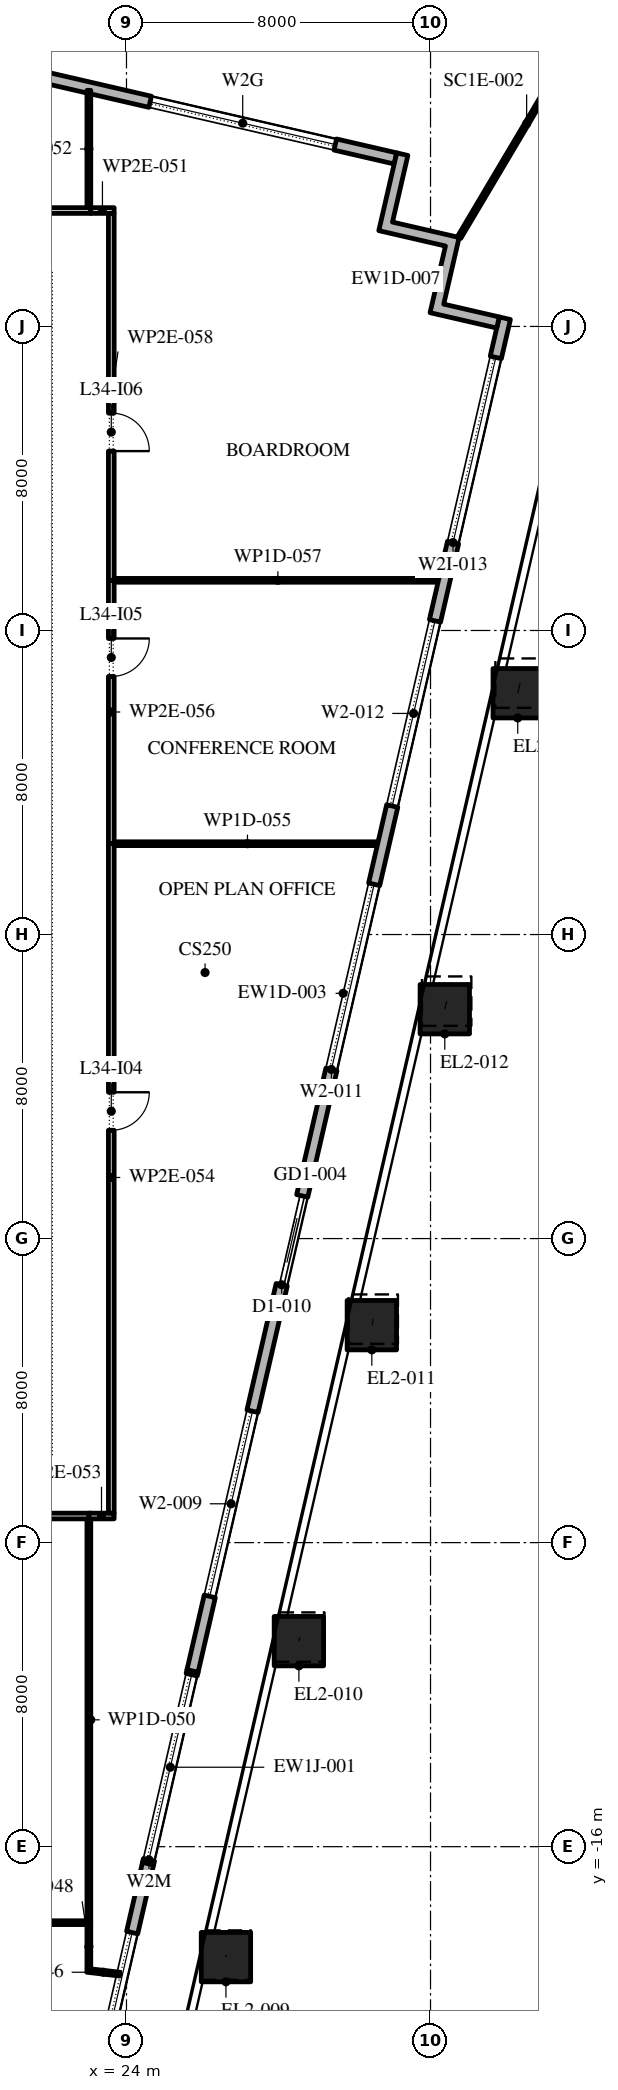
"""IFC4 building model, lengths in metres.
Left out: names, types, materials, properties, quantities, classifications, styles, units other than length and angle.
Written with IfcOpenShell. Run it as: python <this file> out.ifc"""

import sys

from ifc_helpers import new_model, si_unit, direction, frame, frame_2d, origin, origin_2d, place, context, subcontext, project, spatial, polyline, rectangle, outline, extrude, element, fill, save


model = new_model("IFC4")
c1 = context("Model", 3, precision=1e-05, world=origin(), true_north=direction((0.0, 1.0)))
c2 = subcontext(c1, "Body", "Model", "MODEL_VIEW")
j1 = project(units=[si_unit("LENGTHUNIT", "METRE"), si_unit("PLANEANGLEUNIT", "RADIAN")], contexts=[c1])
p1 = place(None, origin())
s1 = spatial("IfcSite", under=j1, at=p1, CompositionType="ELEMENT")
p2 = place(p1, origin())
s2 = spatial("IfcBuilding", under=s1, at=p2, CompositionType="ELEMENT")
p3 = place(p2, frame((0.0, 0.0, 156.0)))
s3 = spatial("IfcBuildingStorey", under=s2, at=p3, CompositionType="ELEMENT", Elevation=156.0)
p4 = place(p3, frame((26.617, -18.906, 0.0), z_axis=(0.002964348167, 0.012671135303, 0.9999153239), x_axis=(-0.973709261374, 0.227794368487, 0.0)))
e1 = element("IfcColumn", 1, at=p4, inside=s3, PredefinedType="COLUMN", context=c2, shape_type="SweptSolid", body=[
    extrude(rectangle(XDim=1.3, YDim=1.3, at=origin_2d()), origin(), (0.0, 0.0, 1.0), 4.2),
])
p5 = place(p3, frame((28.536, -10.592, 0.0), z_axis=(0.005869091843, 0.025277771797, 0.999663237302), x_axis=(-0.974088391429, 0.226167649504, 0.0)))
e2 = element("IfcColumn", 2, at=p5, inside=s3, PredefinedType="COLUMN", context=c2, shape_type="SweptSolid", body=[
    extrude(rectangle(XDim=1.3, YDim=1.3, at=origin_2d()), origin(), (0.0, 0.0, 1.0), 4.201),
])
p6 = place(p3, frame((30.456, -2.279, 0.0), z_axis=(0.008770865357, 0.037987721479, 0.999239713451), x_axis=(-0.97436607968, 0.224968315033, 0.0)))
e3 = element("IfcColumn", 3, at=p6, inside=s3, PredefinedType="COLUMN", context=c2, shape_type="SweptSolid", body=[
    extrude(rectangle(XDim=1.3, YDim=1.3, at=origin_2d()), origin(), (0.0, 0.0, 1.0), 4.203),
])
p7 = place(p3, frame((32.375, 6.035, 0.0), z_axis=(0.011668267153, 0.050562490995, 0.998652735462), x_axis=(-0.974391195695, 0.224859506699, 0.0)))
e4 = element("IfcColumn", 4, at=p7, inside=s3, PredefinedType="COLUMN", context=c2, shape_type="SweptSolid", body=[
    extrude(rectangle(XDim=1.3, YDim=1.3, at=origin_2d()), origin(), (0.0, 0.0, 1.0), 4.206),
])
p8 = place(p3, frame((34.295, 14.349, 0.0), z_axis=(0.014559841898, 0.063111984005, 0.997900239743), x_axis=(-0.97440628778, 0.224794097641, 0.0)))
e5 = element("IfcColumn", 5, at=p8, inside=s3, PredefinedType="COLUMN", context=c2, shape_type="SweptSolid", body=[
    extrude(rectangle(XDim=1.3, YDim=1.3, at=origin_2d()), origin(), (0.0, 0.0, 1.0), 4.209),
])
p9 = place(p3, frame((22.82, -24.016, 0.0), z_axis=(0.0, 0.0, 1.0), x_axis=(0.224962751334, 0.974367364248, 0.0)))
e6 = element("IfcWall", 6, at=p9, inside=s3, PredefinedType="STANDARD", context=c2, shape_type="SweptSolid", body=[
    extrude(rectangle(XDim=7.771, YDim=0.3, at=frame_2d((3.886, 0.0))), origin(), (0.0, 0.0, 1.0), 3.9),
])
p10 = place(p9, frame((0.907, 0.0, 0.45)))
e7 = element("IfcOpeningElement", 7, at=p10, cuts=e6, PredefinedType="OPENING", context=c2, shape_type="SweptSolid", body=[
    extrude(rectangle(XDim=5.0, YDim=3.25, at=frame_2d((2.5, 1.625))), frame((0.0, 0.16, 0.0), z_axis=(0.0, -1.0, 0.0), x_axis=(1.0, 0.0, 0.0)), (0.0, 0.0, 1.0), 0.32),
])
p11 = place(p3, frame((31.078, 28.421, 0.0), z_axis=(0.0, 0.0, 1.0), x_axis=(-0.974370456532, 0.224949357493, 0.0)))
e8 = element("IfcWall", 8, at=p11, inside=s3, PredefinedType="STANDARD", context=c2, shape_type="SweptSolid", body=[
    extrude(rectangle(XDim=51.0, YDim=0.3, at=frame_2d((25.5, 0.0))), origin(), (0.0, 0.0, 1.0), 3.9),
])
p12 = place(p11, frame((1.625, 0.0, 0.45)))
e9 = element("IfcOpeningElement", 9, at=p12, cuts=e8, PredefinedType="OPENING", context=c2, shape_type="SweptSolid", body=[
    extrude(rectangle(XDim=5.0, YDim=2.725, at=frame_2d((2.5, 1.363))), frame((0.0, 0.16, 0.0), z_axis=(0.0, -1.0, 0.0), x_axis=(1.0, 0.0, 0.0)), (0.0, 0.0, 1.0), 0.32),
])
p13 = place(p11, frame((10.025, 0.0, 0.45)))
e10 = element("IfcOpeningElement", 10, at=p13, cuts=e8, PredefinedType="OPENING", context=c2, shape_type="SweptSolid", body=[
    extrude(rectangle(XDim=5.0, YDim=2.65, at=frame_2d((2.5, 1.325))), frame((0.0, 0.16, 0.0), z_axis=(0.0, -1.0, 0.0), x_axis=(1.0, 0.0, 0.0)), (0.0, 0.0, 1.0), 0.32),
])
p14 = place(p11, frame((18.575, 0.0, 0.45)))
e11 = element("IfcOpeningElement", 11, at=p14, cuts=e8, PredefinedType="OPENING", context=c2, shape_type="SweptSolid", body=[
    extrude(rectangle(XDim=5.0, YDim=2.575, at=frame_2d((2.5, 1.288))), frame((0.0, 0.16, 0.0), z_axis=(0.0, -1.0, 0.0), x_axis=(1.0, 0.0, 0.0)), (0.0, 0.0, 1.0), 0.32),
])
p15 = place(p11, frame((28.425, 0.0, 0.0)))
e12 = element("IfcOpeningElement", 12, at=p15, cuts=e8, PredefinedType="OPENING", context=c2, shape_type="SweptSolid", body=[
    extrude(rectangle(XDim=2.4, YDim=3.5, at=frame_2d((1.2, 1.75))), frame((0.0, 0.16, 0.0), z_axis=(0.0, -1.0, 0.0), x_axis=(1.0, 0.0, 0.0)), (0.0, 0.0, 1.0), 0.32),
])
p16 = place(p11, frame((35.675, 0.0, 0.45)))
e13 = element("IfcOpeningElement", 13, at=p16, cuts=e8, PredefinedType="OPENING", context=c2, shape_type="SweptSolid", body=[
    extrude(rectangle(XDim=5.0, YDim=2.4, at=frame_2d((2.5, 1.2))), frame((0.0, 0.16, 0.0), z_axis=(0.0, -1.0, 0.0), x_axis=(1.0, 0.0, 0.0)), (0.0, 0.0, 1.0), 0.32),
])
p17 = place(p11, frame((44.225, 0.0, 0.45)))
e14 = element("IfcOpeningElement", 14, at=p17, cuts=e8, PredefinedType="OPENING", context=c2, shape_type="SweptSolid", body=[
    extrude(rectangle(XDim=5.0, YDim=3.25, at=frame_2d((2.5, 1.625))), frame((0.0, 0.16, 0.0), z_axis=(0.0, -1.0, 0.0), x_axis=(1.0, 0.0, 0.0)), (0.0, 0.0, 1.0), 0.32),
])
p18 = place(p3, origin())
e15 = element("IfcWall", 15, at=p18, inside=s3, PredefinedType="STANDARD", context=c2, shape_type="SweptSolid", body=[
    extrude(outline(polyline([(32.393, 26.116), (30.639, 26.521), (31.111, 28.567), (31.404, 28.5), (30.999, 26.746), (32.753, 26.341), (32.348, 24.587), (33.809, 24.25), (33.742, 23.957), (31.988, 24.362), (32.393, 26.116)])), origin(), (0.0, 0.0, 1.0), 3.9),
])
p19 = place(p3, frame((32.753, 26.341, -0.05), z_axis=(0.0, 0.0, 1.0), x_axis=(0.510322384833, 0.859983176311, 0.0)))
e16 = element("IfcWall", 16, at=p19, inside=s3, PredefinedType="STANDARD", context=c2, shape_type="SweptSolid", body=[
    extrude(rectangle(XDim=6.961, YDim=0.1, at=frame_2d((3.48, 0.0))), origin(), (0.0, 0.0, 1.0), 3.95),
])
p20 = place(p3, frame((10.32, 27.05, 0.0), z_axis=(0.0, 0.0, 1.0), x_axis=(1.0, 0.0, 0.0)))
e17 = element("IfcWall", 17, at=p20, inside=s3, PredefinedType="PARTITIONING", context=c2, shape_type="SweptSolid", body=[
    extrude(rectangle(XDim=12.74, YDim=0.15, at=frame_2d((6.37, 0.0))), origin(), (0.0, 0.0, 1.0), 3.9),
])
p21 = place(p20, frame((7.04, 0.0, 0.0)))
e18 = element("IfcOpeningElement", 18, at=p21, cuts=e17, PredefinedType="OPENING", context=c2, shape_type="SweptSolid", body=[
    extrude(rectangle(XDim=1.0, YDim=2.1, at=frame_2d((0.5, 1.05))), frame((0.0, 0.085, 0.0), z_axis=(0.0, -1.0, 0.0), x_axis=(1.0, 0.0, 0.0)), (0.0, 0.0, 1.0), 0.17),
])
p22 = place(p3, frame((22.96, -19.254, 0.0), z_axis=(0.0, 0.0, 1.0), x_axis=(0.993370815498, -0.114954003487, 0.0)))
e19 = element("IfcWall", 19, at=p22, inside=s3, PredefinedType="PARTITIONING", context=c2, shape_type="SweptSolid", body=[
    extrude(rectangle(XDim=0.871, YDim=0.1, at=frame_2d((0.436, 0.0))), origin(), (0.0, 0.0, 1.0), 3.9),
])
p23 = place(p3, frame((23.06, -18.0, 0.0), z_axis=(0.0, 0.0, 1.0), x_axis=(-1.0, 0.0, 0.0)))
e20 = element("IfcWall", 20, at=p23, inside=s3, PredefinedType="PARTITIONING", context=c2, shape_type="SweptSolid", body=[
    extrude(rectangle(XDim=12.69, YDim=0.1, at=frame_2d((6.345, 0.0))), origin(), (0.0, 0.0, 1.0), 3.9),
])
p24 = place(p23, frame((5.89, 0.0, 0.0)))
e21 = element("IfcOpeningElement", 21, at=p24, cuts=e20, PredefinedType="OPENING", context=c2, shape_type="SweptSolid", body=[
    extrude(rectangle(XDim=0.9, YDim=2.1, at=frame_2d((0.45, 1.05))), frame((0.0, 0.06, 0.0), z_axis=(0.0, -1.0, 0.0), x_axis=(1.0, 0.0, 0.0)), (0.0, 0.0, 1.0), 0.12),
])
p25 = place(p3, frame((23.01, -18.05, 0.0), z_axis=(0.0, 0.0, 1.0), x_axis=(0.0, -1.0, 0.0)))
e22 = element("IfcWall", 22, at=p25, inside=s3, PredefinedType="PARTITIONING", context=c2, shape_type="SweptSolid", body=[
    extrude(rectangle(XDim=1.16, YDim=0.1, at=frame_2d((0.58, 0.0))), origin(), (0.0, 0.0, 1.0), 3.9),
])
p26 = place(p3, frame((23.06, -7.3, 0.0), z_axis=(0.0, 0.0, 1.0), x_axis=(-1.0, 0.0, 0.0)))
e23 = element("IfcWall", 23, at=p26, inside=s3, PredefinedType="PARTITIONING", context=c2, shape_type="SweptSolid", body=[
    extrude(rectangle(XDim=12.69, YDim=0.15, at=frame_2d((6.345, 0.0))), origin(), (0.0, 0.0, 1.0), 3.9),
])
p27 = place(p26, frame((5.84, 0.0, 0.0)))
e24 = element("IfcOpeningElement", 24, at=p27, cuts=e23, PredefinedType="OPENING", context=c2, shape_type="SweptSolid", body=[
    extrude(rectangle(XDim=1.0, YDim=2.1, at=frame_2d((0.5, 1.05))), frame((0.0, 0.085, 0.0), z_axis=(0.0, -1.0, 0.0), x_axis=(1.0, 0.0, 0.0)), (0.0, 0.0, 1.0), 0.17),
])
p28 = place(p3, frame((23.01, -7.375, 0.0), z_axis=(0.0, 0.0, 1.0), x_axis=(0.0, -1.0, 0.0)))
e25 = element("IfcWall", 25, at=p28, inside=s3, PredefinedType="PARTITIONING", context=c2, shape_type="SweptSolid", body=[
    extrude(rectangle(XDim=10.575, YDim=0.1, at=frame_2d((5.288, 0.0))), origin(), (0.0, 0.0, 1.0), 3.9),
])
p29 = place(p3, frame((23.06, 27.05, 0.0), z_axis=(0.0, 0.0, 1.0), x_axis=(1.0, 0.0, 0.0)))
e26 = element("IfcWall", 26, at=p29, inside=s3, PredefinedType="PARTITIONING", context=c2, shape_type="SweptSolid", body=[
    extrude(rectangle(XDim=0.615, YDim=0.15, at=frame_2d((0.308, 0.0))), origin(), (0.0, 0.0, 1.0), 3.9),
])
p30 = place(p3, frame((23.01, 30.212, 0.0), z_axis=(0.0, 0.0, 1.0), x_axis=(0.0, -1.0, 0.0)))
e27 = element("IfcWall", 27, at=p30, inside=s3, PredefinedType="PARTITIONING", context=c2, shape_type="SweptSolid", body=[
    extrude(rectangle(XDim=3.087, YDim=0.1, at=frame_2d((1.543, 0.0))), origin(), (0.0, 0.0, 1.0), 3.9),
])
p31 = place(p3, frame((23.675, -7.3, 0.0), z_axis=(0.0, 0.0, 1.0), x_axis=(-1.0, 0.0, 0.0)))
e28 = element("IfcWall", 28, at=p31, inside=s3, PredefinedType="PARTITIONING", context=c2, shape_type="SweptSolid", body=[
    extrude(rectangle(XDim=0.665, YDim=0.15, at=frame_2d((0.333, 0.0))), origin(), (0.0, 0.0, 1.0), 3.9),
])
p32 = place(p3, frame((23.6, 10.44, 0.0), z_axis=(0.0, 0.0, 1.0), x_axis=(0.0, -1.0, 0.0)))
e29 = element("IfcWall", 29, at=p32, inside=s3, PredefinedType="PARTITIONING", context=c2, shape_type="SweptSolid", body=[
    extrude(rectangle(XDim=17.665, YDim=0.15, at=frame_2d((8.833, 0.0))), origin(), (0.0, 0.0, 1.0), 3.9),
])
p33 = place(p32, frame((6.59, 0.0, 0.0)))
e30 = element("IfcOpeningElement", 30, at=p33, cuts=e29, PredefinedType="OPENING", context=c2, shape_type="SweptSolid", body=[
    extrude(rectangle(XDim=1.0, YDim=2.1, at=frame_2d((0.5, 1.05))), frame((0.0, 0.085, 0.0), z_axis=(0.0, -1.0, 0.0), x_axis=(1.0, 0.0, 0.0)), (0.0, 0.0, 1.0), 0.17),
])
p34 = place(p3, frame((23.675, 10.39, 0.0), z_axis=(0.0, 0.0, 1.0), x_axis=(1.0, 0.0, 0.0)))
e31 = element("IfcWall", 31, at=p34, inside=s3, PredefinedType="PARTITIONING", context=c2, shape_type="SweptSolid", body=[
    extrude(rectangle(XDim=7.017, YDim=0.1, at=frame_2d((3.508, 0.0))), origin(), (0.0, 0.0, 1.0), 3.9),
])
p35 = place(p3, frame((23.6, 17.32, 0.0), z_axis=(0.0, 0.0, 1.0), x_axis=(0.0, -1.0, 0.0)))
e32 = element("IfcWall", 32, at=p35, inside=s3, PredefinedType="PARTITIONING", context=c2, shape_type="SweptSolid", body=[
    extrude(rectangle(XDim=6.93, YDim=0.15, at=frame_2d((3.465, 0.0))), origin(), (0.0, 0.0, 1.0), 3.9),
])
p36 = place(p35, frame((1.53, 0.0, 0.0)))
e33 = element("IfcOpeningElement", 33, at=p36, cuts=e32, PredefinedType="OPENING", context=c2, shape_type="SweptSolid", body=[
    extrude(rectangle(XDim=1.0, YDim=2.1, at=frame_2d((0.5, 1.05))), frame((0.0, 0.085, 0.0), z_axis=(0.0, -1.0, 0.0), x_axis=(1.0, 0.0, 0.0)), (0.0, 0.0, 1.0), 0.17),
])
p37 = place(p3, frame((23.675, 17.32, 0.0), z_axis=(0.0, 0.0, 1.0), x_axis=(1.0, 0.0, 0.0)))
e34 = element("IfcWall", 34, at=p37, inside=s3, PredefinedType="PARTITIONING", context=c2, shape_type="SweptSolid", body=[
    extrude(rectangle(XDim=8.617, YDim=0.1, at=frame_2d((4.309, 0.0))), origin(), (0.0, 0.0, 1.0), 3.9),
])
p38 = place(p3, frame((23.6, 26.975, 0.0), z_axis=(0.0, 0.0, 1.0), x_axis=(0.0, -1.0, 0.0)))
e35 = element("IfcWall", 35, at=p38, inside=s3, PredefinedType="PARTITIONING", context=c2, shape_type="SweptSolid", body=[
    extrude(rectangle(XDim=9.655, YDim=0.15, at=frame_2d((4.828, 0.0))), origin(), (0.0, 0.0, 1.0), 3.9),
])
p39 = place(p38, frame((5.255, 0.0, 0.0)))
e36 = element("IfcOpeningElement", 36, at=p39, cuts=e35, PredefinedType="OPENING", context=c2, shape_type="SweptSolid", body=[
    extrude(rectangle(XDim=1.0, YDim=2.1, at=frame_2d((0.5, 1.05))), frame((0.0, 0.085, 0.0), z_axis=(0.0, -1.0, 0.0), x_axis=(1.0, 0.0, 0.0)), (0.0, 0.0, 1.0), 0.17),
])
p40 = place(p3, frame((24.569, -16.443, 0.0), z_axis=(0.0, 0.0, 1.0), x_axis=(0.224941801871, 0.974372200841, 0.0)))
e37 = element("IfcWall", 37, at=p40, inside=s3, PredefinedType="STANDARD", context=c2, shape_type="SweptSolid", body=[
    extrude(rectangle(XDim=5.2, YDim=0.3, at=frame_2d((2.6, 0.0))), origin(), (0.0, 0.0, 1.0), 2.93),
])
p41 = place(p40, frame((0.1, 0.0, 0.45)))
e38 = element("IfcOpeningElement", 38, at=p41, cuts=e37, PredefinedType="OPENING", context=c2, shape_type="SweptSolid", body=[
    extrude(rectangle(XDim=5.0, YDim=2.35, at=frame_2d((2.5, 1.175))), frame((0.0, 0.16, 0.0), z_axis=(0.0, -1.0, 0.0), x_axis=(1.0, 0.0, 0.0)), (0.0, 0.0, 1.0), 0.32),
])
p42 = place(p3, frame((25.738, -11.377, 0.0), z_axis=(0.0, 0.0, 1.0), x_axis=(0.224953713156, 0.974369450946, 0.0)))
e39 = element("IfcWall", 39, at=p42, inside=s3, PredefinedType="STANDARD", context=c2, shape_type="SweptSolid", body=[
    extrude(rectangle(XDim=36.529, YDim=0.3, at=frame_2d((18.264, 0.0))), origin(), (0.0, 0.0, 1.0), 3.9),
])
p43 = place(p42, frame((2.014, 0.0, 0.45)))
e40 = element("IfcOpeningElement", 40, at=p43, cuts=e39, PredefinedType="OPENING", context=c2, shape_type="SweptSolid", body=[
    extrude(rectangle(XDim=5.0, YDim=3.25, at=frame_2d((2.5, 1.625))), frame((0.0, 0.16, 0.0), z_axis=(0.0, -1.0, 0.0), x_axis=(1.0, 0.0, 0.0)), (0.0, 0.0, 1.0), 0.32),
])
p44 = place(p42, frame((10.429, 0.0, 0.0)))
e41 = element("IfcOpeningElement", 41, at=p44, cuts=e39, PredefinedType="OPENING", context=c2, shape_type="SweptSolid", body=[
    extrude(rectangle(XDim=2.4, YDim=3.5, at=frame_2d((1.2, 1.75))), frame((0.0, 0.16, 0.0), z_axis=(0.0, -1.0, 0.0), x_axis=(1.0, 0.0, 0.0)), (0.0, 0.0, 1.0), 0.32),
])
p45 = place(p42, frame((16.243, 0.0, 0.45)))
e42 = element("IfcOpeningElement", 42, at=p45, cuts=e39, PredefinedType="OPENING", context=c2, shape_type="SweptSolid", body=[
    extrude(rectangle(XDim=5.0, YDim=3.25, at=frame_2d((2.5, 1.625))), frame((0.0, 0.16, 0.0), z_axis=(0.0, -1.0, 0.0), x_axis=(1.0, 0.0, 0.0)), (0.0, 0.0, 1.0), 0.32),
])
p46 = place(p42, frame((23.357, 0.0, 0.45)))
e43 = element("IfcOpeningElement", 43, at=p46, cuts=e39, PredefinedType="OPENING", context=c2, shape_type="SweptSolid", body=[
    extrude(rectangle(XDim=5.0, YDim=3.25, at=frame_2d((2.5, 1.625))), frame((0.0, 0.16, 0.0), z_axis=(0.0, -1.0, 0.0), x_axis=(1.0, 0.0, 0.0)), (0.0, 0.0, 1.0), 0.32),
])
p47 = place(p42, frame((30.471, 0.0, 0.45)))
e44 = element("IfcOpeningElement", 44, at=p47, cuts=e39, PredefinedType="OPENING", context=c2, shape_type="SweptSolid", body=[
    extrude(rectangle(XDim=5.0, YDim=2.65, at=frame_2d((2.5, 1.325))), frame((0.0, 0.16, 0.0), z_axis=(0.0, -1.0, 0.0), x_axis=(1.0, 0.0, 0.0)), (0.0, 0.0, 1.0), 0.32),
])
p48 = place(p10, origin())
e45 = element("IfcWindow", 45, at=p48, inside=s3, PartitioningType="DOUBLE_PANEL_VERTICAL", PredefinedType="WINDOW", context=c2, shape_type="SweptSolid", body=[
    extrude(rectangle(XDim=5.0, YDim=3.25, at=frame_2d((2.5, 1.625))), frame((0.0, 0.03, 0.0), z_axis=(0.0, -1.0, 0.0), x_axis=(1.0, 0.0, 0.0)), (0.0, 0.0, 1.0), 0.06),
])
fill(e7, e45)
p49 = place(p41, origin())
e46 = element("IfcWindow", 46, at=p49, inside=s3, PartitioningType="DOUBLE_PANEL_VERTICAL", PredefinedType="WINDOW", context=c2, shape_type="SweptSolid", body=[
    extrude(rectangle(XDim=5.0, YDim=2.35, at=frame_2d((2.5, 1.175))), frame((0.0, 0.03, 0.0), z_axis=(0.0, -1.0, 0.0), x_axis=(1.0, 0.0, 0.0)), (0.0, 0.0, 1.0), 0.06),
])
fill(e38, e46)
p50 = place(p43, origin())
e47 = element("IfcWindow", 47, at=p50, inside=s3, PartitioningType="DOUBLE_PANEL_VERTICAL", PredefinedType="WINDOW", context=c2, shape_type="SweptSolid", body=[
    extrude(rectangle(XDim=5.0, YDim=3.25, at=frame_2d((2.5, 1.625))), frame((0.0, 0.03, 0.0), z_axis=(0.0, -1.0, 0.0), x_axis=(1.0, 0.0, 0.0)), (0.0, 0.0, 1.0), 0.06),
])
fill(e40, e47)
p51 = place(p44, origin())
e48 = element("IfcDoor", 48, at=p51, inside=s3, OperationType="DOUBLE_DOOR_SLIDING", PredefinedType="DOOR", context=c2, shape_type="SweptSolid", body=[
    extrude(rectangle(XDim=2.4, YDim=3.5, at=frame_2d((1.2, 1.75))), frame((0.0, 0.025, 0.0), z_axis=(0.0, -1.0, 0.0), x_axis=(1.0, 0.0, 0.0)), (0.0, 0.0, 1.0), 0.05),
])
fill(e41, e48)
p52 = place(p45, origin())
e49 = element("IfcWindow", 49, at=p52, inside=s3, PartitioningType="DOUBLE_PANEL_VERTICAL", PredefinedType="WINDOW", context=c2, shape_type="SweptSolid", body=[
    extrude(rectangle(XDim=5.0, YDim=3.25, at=frame_2d((2.5, 1.625))), frame((0.0, 0.03, 0.0), z_axis=(0.0, -1.0, 0.0), x_axis=(1.0, 0.0, 0.0)), (0.0, 0.0, 1.0), 0.06),
])
fill(e42, e49)
p53 = place(p46, origin())
e50 = element("IfcWindow", 50, at=p53, inside=s3, PartitioningType="DOUBLE_PANEL_VERTICAL", PredefinedType="WINDOW", context=c2, shape_type="SweptSolid", body=[
    extrude(rectangle(XDim=5.0, YDim=3.25, at=frame_2d((2.5, 1.625))), frame((0.0, 0.03, 0.0), z_axis=(0.0, -1.0, 0.0), x_axis=(1.0, 0.0, 0.0)), (0.0, 0.0, 1.0), 0.06),
])
fill(e43, e50)
p54 = place(p47, origin())
e51 = element("IfcWindow", 51, at=p54, inside=s3, PartitioningType="DOUBLE_PANEL_VERTICAL", PredefinedType="WINDOW", context=c2, shape_type="SweptSolid", body=[
    extrude(rectangle(XDim=5.0, YDim=2.65, at=frame_2d((2.5, 1.325))), frame((0.0, 0.03, 0.0), z_axis=(0.0, -1.0, 0.0), x_axis=(1.0, 0.0, 0.0)), (0.0, 0.0, 1.0), 0.06),
])
fill(e44, e51)
p55 = place(p12, origin())
e52 = element("IfcWindow", 52, at=p55, inside=s3, PartitioningType="DOUBLE_PANEL_VERTICAL", PredefinedType="WINDOW", context=c2, shape_type="SweptSolid", body=[
    extrude(rectangle(XDim=5.0, YDim=2.725, at=frame_2d((2.5, 1.363))), frame((0.0, 0.03, 0.0), z_axis=(0.0, -1.0, 0.0), x_axis=(1.0, 0.0, 0.0)), (0.0, 0.0, 1.0), 0.06),
])
fill(e9, e52)
p56 = place(p33, origin())
e53 = element("IfcDoor", 53, at=p56, inside=s3, OperationType="SINGLE_SWING_RIGHT", PredefinedType="DOOR", context=c2, shape_type="SweptSolid", body=[
    extrude(rectangle(XDim=1.0, YDim=2.1, at=frame_2d((0.5, 1.05))), frame((0.0, 0.025, 0.0), z_axis=(0.0, -1.0, 0.0), x_axis=(1.0, 0.0, 0.0)), (0.0, 0.0, 1.0), 0.05),
])
fill(e30, e53)
p57 = place(p36, origin())
e54 = element("IfcDoor", 54, at=p57, inside=s3, OperationType="SINGLE_SWING_RIGHT", PredefinedType="DOOR", context=c2, shape_type="SweptSolid", body=[
    extrude(rectangle(XDim=1.0, YDim=2.1, at=frame_2d((0.5, 1.05))), frame((0.0, 0.025, 0.0), z_axis=(0.0, -1.0, 0.0), x_axis=(1.0, 0.0, 0.0)), (0.0, 0.0, 1.0), 0.05),
])
fill(e33, e54)
p58 = place(p39, origin())
e55 = element("IfcDoor", 55, at=p58, inside=s3, OperationType="SINGLE_SWING_LEFT", PredefinedType="DOOR", context=c2, shape_type="SweptSolid", body=[
    extrude(rectangle(XDim=1.0, YDim=2.1, at=frame_2d((0.5, 1.05))), frame((0.0, 0.025, 0.0), z_axis=(0.0, -1.0, 0.0), x_axis=(1.0, 0.0, 0.0)), (0.0, 0.0, 1.0), 0.05),
])
fill(e36, e55)
save(model, sys.argv[1])
